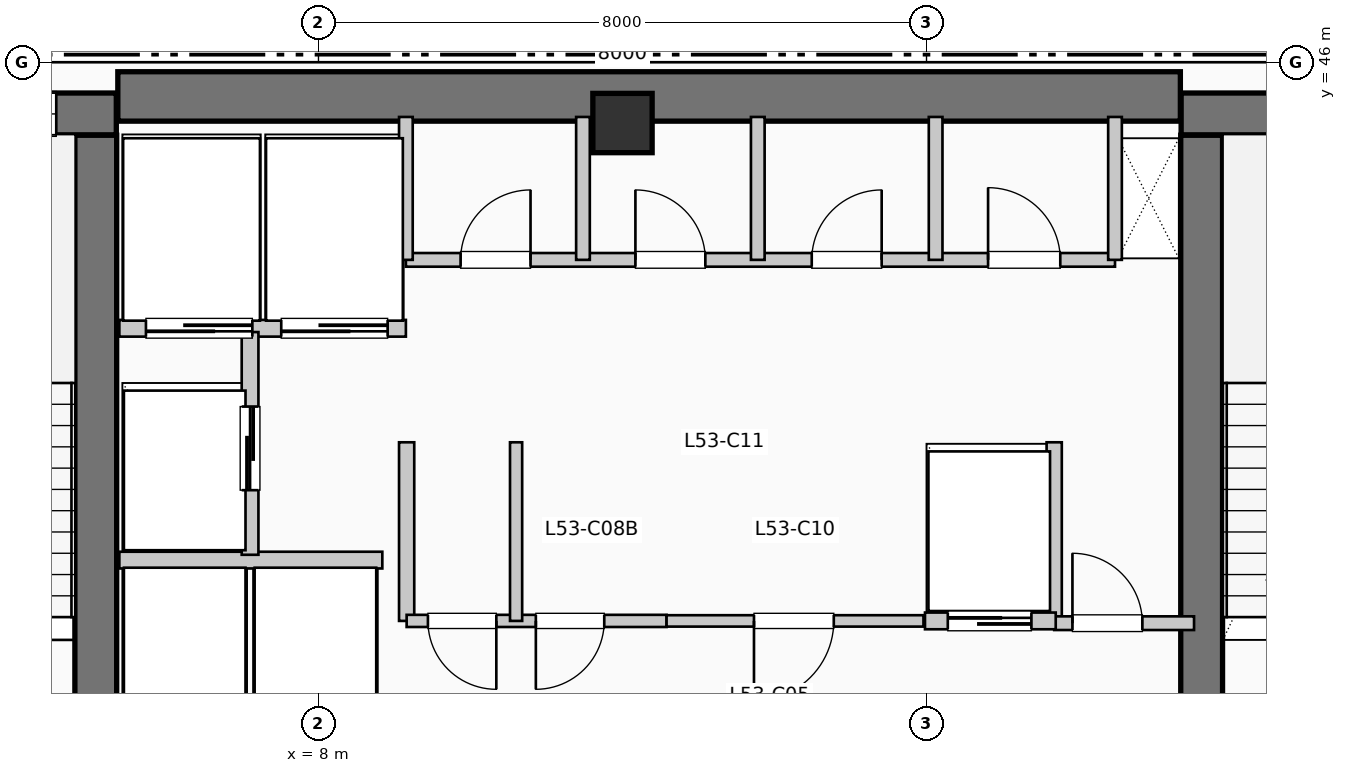
"""IFC4 building model, lengths in metres.
Left out: names, types, materials, properties, quantities, classifications, styles, units other than length and angle.
Written with IfcOpenShell. Run it as: python <this file> out.ifc"""

import sys

from ifc_helpers import new_model, si_unit, direction, frame, frame_2d, origin, origin_2d, place, context, subcontext, project, spatial, rectangle, extrude, element, fill, save


model = new_model("IFC4")
c1 = context("Model", 3, precision=1e-05, world=origin(), true_north=direction((0.0, 1.0)))
c2 = subcontext(c1, "Body", "Model", "MODEL_VIEW")
j1 = project(units=[si_unit("LENGTHUNIT", "METRE"), si_unit("PLANEANGLEUNIT", "RADIAN")], contexts=[c1])
p1 = place(None, origin())
s1 = spatial("IfcSite", under=j1, at=p1, CompositionType="ELEMENT")
p2 = place(p1, origin())
s2 = spatial("IfcBuilding", under=s1, at=p2, CompositionType="ELEMENT")
p3 = place(p2, frame((0.0, 0.0, 219.78)))
s3 = spatial("IfcBuildingStorey", under=s2, at=p3, CompositionType="ELEMENT", Elevation=219.78)
p4 = place(p3, frame((5.36, 45.55, 0.0), z_axis=(0.0, 0.0, 1.0), x_axis=(1.0, 0.0, 0.0)))
e1 = element("IfcWall", 1, at=p4, inside=s3, PredefinedType="SHEAR", context=c2, shape_type="SweptSolid", body=[
    extrude(rectangle(XDim=13.98, YDim=0.65, at=frame_2d((6.99, 0.0))), origin(), (0.0, 0.0, 1.0), 3.96),
])
p5 = place(p3, frame((5.07, 37.15, 0.0), z_axis=(0.0, 0.0, 1.0), x_axis=(0.0, 1.0, 0.0)))
e2 = element("IfcWall", 2, at=p5, inside=s3, PredefinedType="SHEAR", context=c2, shape_type="SweptSolid", body=[
    extrude(rectangle(XDim=7.89, YDim=0.55, at=frame_2d((3.945, 0.0))), origin(), (0.0, 0.0, 1.0), 3.96),
])
p6 = place(p3, frame((1.1, 45.32, 0.0), z_axis=(0.0, 0.0, 1.0), x_axis=(1.0, 0.0, 0.0)))
e3 = element("IfcWall", 3, at=p6, inside=s3, PredefinedType="SHEAR", context=c2, shape_type="SweptSolid", body=[
    extrude(rectangle(XDim=4.24, YDim=0.55, at=frame_2d((2.12, 0.0))), origin(), (0.0, 0.0, 1.0), 3.96),
])
p7 = place(p6, frame((2.05, 0.0, 1.05)))
e4 = element("IfcOpeningElement", 4, at=p7, cuts=e3, PredefinedType="OPENING", context=c2, shape_type="SweptSolid", body=[
    extrude(rectangle(XDim=1.4, YDim=1.8, at=frame_2d((0.7, 0.9))), frame((0.0, 0.285, 0.0), z_axis=(0.0, -1.0, 0.0), x_axis=(1.0, 0.0, 0.0)), (0.0, 0.0, 1.0), 0.57),
])
p8 = place(p3, frame((19.62, 37.15, 0.0), z_axis=(0.0, 0.0, 1.0), x_axis=(0.0, 1.0, 0.0)))
e5 = element("IfcWall", 5, at=p8, inside=s3, PredefinedType="SHEAR", context=c2, shape_type="SweptSolid", body=[
    extrude(rectangle(XDim=7.89, YDim=0.55, at=frame_2d((3.945, 0.0))), origin(), (0.0, 0.0, 1.0), 3.96),
])
p9 = place(p3, frame((19.35, 45.32, 0.0), z_axis=(0.0, 0.0, 1.0), x_axis=(1.0, 0.0, 0.0)))
e6 = element("IfcWall", 6, at=p9, inside=s3, PredefinedType="SHEAR", context=c2, shape_type="SweptSolid", body=[
    extrude(rectangle(XDim=3.69, YDim=0.55, at=frame_2d((1.845, 0.0))), origin(), (0.0, 0.0, 1.0), 3.96),
])
p10 = place(p9, frame((1.15, 0.0, 1.05)))
e7 = element("IfcOpeningElement", 7, at=p10, cuts=e6, PredefinedType="OPENING", context=c2, shape_type="SweptSolid", body=[
    extrude(rectangle(XDim=1.4, YDim=1.8, at=frame_2d((0.7, 0.9))), frame((0.0, 0.285, 0.0), z_axis=(0.0, -1.0, 0.0), x_axis=(1.0, 0.0, 0.0)), (0.0, 0.0, 1.0), 0.57),
])
p11 = place(p3, frame((12.0, 45.2, 0.0), z_axis=(0.0, 0.0, 1.0), x_axis=(1.0, 0.0, 0.0)))
e8 = element("IfcColumn", 8, at=p11, inside=s3, PredefinedType="COLUMN", context=c2, shape_type="SweptSolid", body=[
    extrude(rectangle(XDim=0.78, YDim=0.78, at=origin_2d()), origin(), (0.0, 0.0, 1.0), 3.96),
])
p12 = place(p3, frame((5.38, 39.45, 0.0), z_axis=(0.0, 0.0, 1.0), x_axis=(1.0, 0.0, 0.0)))
e9 = element("IfcWall", 9, at=p12, inside=s3, PredefinedType="PARTITIONING", context=c2, shape_type="SweptSolid", body=[
    extrude(rectangle(XDim=3.46, YDim=0.22, at=frame_2d((1.73, 0.0))), origin(), (0.0, 0.0, 1.0), 3.71),
])
p13 = place(p3, frame((5.38, 42.5, 0.0), z_axis=(0.0, 0.0, 1.0), x_axis=(1.0, 0.0, 0.0)))
e10 = element("IfcWall", 10, at=p13, inside=s3, PredefinedType="PARTITIONING", context=c2, shape_type="SweptSolid", body=[
    extrude(rectangle(XDim=3.77, YDim=0.22, at=frame_2d((1.885, 0.0))), origin(), (0.0, 0.0, 1.0), 3.71),
])
p14 = place(p13, frame((1.75, 0.0, 0.0), z_axis=(0.0, 0.0, 1.0), x_axis=(-1.0, 0.0, 0.0)))
e11 = element("IfcOpeningElement", 11, at=p14, cuts=e10, PredefinedType="OPENING", context=c2, shape_type="SweptSolid", body=[
    extrude(rectangle(XDim=1.4, YDim=2.2, at=frame_2d((0.7, 1.1))), frame((0.0, 0.12, 0.0), z_axis=(0.0, -1.0, 0.0), x_axis=(1.0, 0.0, 0.0)), (0.0, 0.0, 1.0), 0.24),
])
p15 = place(p13, frame((3.53, 0.0, 0.0), z_axis=(0.0, 0.0, 1.0), x_axis=(-1.0, 0.0, 0.0)))
e12 = element("IfcOpeningElement", 12, at=p15, cuts=e10, PredefinedType="OPENING", context=c2, shape_type="SweptSolid", body=[
    extrude(rectangle(XDim=1.4, YDim=2.2, at=frame_2d((0.7, 1.1))), frame((0.0, 0.12, 0.0), z_axis=(0.0, -1.0, 0.0), x_axis=(1.0, 0.0, 0.0)), (0.0, 0.0, 1.0), 0.24),
])
p16 = place(p3, frame((7.1, 39.52, 0.0), z_axis=(0.0, 0.0, 1.0), x_axis=(0.0, 1.0, 0.0)))
e13 = element("IfcWall", 13, at=p16, inside=s3, PredefinedType="PARTITIONING", context=c2, shape_type="SweptSolid", body=[
    extrude(rectangle(XDim=2.93, YDim=0.22, at=frame_2d((1.465, 0.0))), origin(), (0.0, 0.0, 1.0), 3.71),
])
p17 = place(p16, frame((0.85, 0.0, 0.0)))
e14 = element("IfcOpeningElement", 14, at=p17, cuts=e13, PredefinedType="OPENING", context=c2, shape_type="SweptSolid", body=[
    extrude(rectangle(XDim=1.1, YDim=2.2, at=frame_2d((0.55, 1.1))), frame((0.0, 0.12, 0.0), z_axis=(0.0, -1.0, 0.0), x_axis=(1.0, 0.0, 0.0)), (0.0, 0.0, 1.0), 0.24),
])
for number, where, z_axis, x_axis in (
    (15, (9.16, 38.65, 0.0), (0.0, 0.0, 1.0), (0.0, 1.0, 0.0)),
    (16, (17.68, 38.65, 0.0), (0.0, 0.0, 1.0), (0.0, 1.0, 0.0)),
):
    element("IfcWall", number, at=place(p3, frame(where, z_axis=z_axis, x_axis=x_axis)), inside=s3, PredefinedType="PARTITIONING", context=c2, shape_type="SweptSolid", body=[
        extrude(rectangle(XDim=2.35, YDim=0.2, at=frame_2d((1.175, 0.0))), origin(), (0.0, 0.0, 1.0), 3.71),
    ])
p18 = place(p3, frame((17.68, 38.62, 0.0), z_axis=(0.0, 0.0, 1.0), x_axis=(1.0, 0.0, 0.0)))
e17 = element("IfcWall", 17, at=p18, inside=s3, PredefinedType="PARTITIONING", context=c2, shape_type="SweptSolid", body=[
    extrude(rectangle(XDim=1.84, YDim=0.18, at=frame_2d((0.92, 0.0))), origin(), (0.0, 0.0, 1.0), 3.71),
])
p19 = place(p18, frame((0.24, 0.0, 0.0)))
e18 = element("IfcOpeningElement", 18, at=p19, cuts=e17, PredefinedType="OPENING", context=c2, shape_type="SweptSolid", body=[
    extrude(rectangle(XDim=0.92, YDim=2.1, at=frame_2d((0.46, 1.05))), frame((0.0, 0.1, 0.0), z_axis=(0.0, -1.0, 0.0), x_axis=(1.0, 0.0, 0.0)), (0.0, 0.0, 1.0), 0.2),
])
p20 = place(p3, frame((9.16, 38.65, 0.0), z_axis=(0.0, 0.0, 1.0), x_axis=(1.0, 0.0, 0.0)))
e19 = element("IfcWall", 19, at=p20, inside=s3, PredefinedType="PARTITIONING", context=c2, shape_type="SweptSolid", body=[
    extrude(rectangle(XDim=3.42, YDim=0.16, at=frame_2d((1.71, 0.0))), origin(), (0.0, 0.0, 1.0), 3.71),
])
p21 = place(p20, frame((1.18, 0.0, 0.0), z_axis=(0.0, 0.0, 1.0), x_axis=(-1.0, 0.0, 0.0)))
e20 = element("IfcOpeningElement", 20, at=p21, cuts=e19, PredefinedType="OPENING", context=c2, shape_type="SweptSolid", body=[
    extrude(rectangle(XDim=0.9, YDim=2.15, at=frame_2d((0.45, 1.075))), frame((0.0, 0.09, 0.0), z_axis=(0.0, -1.0, 0.0), x_axis=(1.0, 0.0, 0.0)), (0.0, 0.0, 1.0), 0.18),
])
p22 = place(p20, frame((2.6, 0.0, 0.0), z_axis=(0.0, 0.0, 1.0), x_axis=(-1.0, 0.0, 0.0)))
e21 = element("IfcOpeningElement", 21, at=p22, cuts=e19, PredefinedType="OPENING", context=c2, shape_type="SweptSolid", body=[
    extrude(rectangle(XDim=0.9, YDim=2.15, at=frame_2d((0.45, 1.075))), frame((0.0, 0.09, 0.0), z_axis=(0.0, -1.0, 0.0), x_axis=(1.0, 0.0, 0.0)), (0.0, 0.0, 1.0), 0.18),
])
p23 = place(p3, frame((10.6, 38.65, 0.0), z_axis=(0.0, 0.0, 1.0), x_axis=(0.0, 1.0, 0.0)))
e22 = element("IfcWall", 22, at=p23, inside=s3, PredefinedType="PARTITIONING", context=c2, shape_type="SweptSolid", body=[
    extrude(rectangle(XDim=2.35, YDim=0.16, at=frame_2d((1.175, 0.0))), origin(), (0.0, 0.0, 1.0), 3.71),
])
p24 = place(p3, frame((12.58, 38.65, 0.0), z_axis=(0.0, 0.0, 1.0), x_axis=(1.0, 0.0, 0.0)))
e23 = element("IfcWall", 23, at=p24, inside=s3, PredefinedType="PARTITIONING", context=c2, shape_type="SweptSolid", body=[
    extrude(rectangle(XDim=3.38, YDim=0.15, at=frame_2d((1.69, 0.0))), origin(), (0.0, 0.0, 1.0), 3.71),
])
p25 = place(p24, frame((2.2, 0.0, 0.0), z_axis=(0.0, 0.0, 1.0), x_axis=(-1.0, 0.0, 0.0)))
e24 = element("IfcOpeningElement", 24, at=p25, cuts=e23, PredefinedType="OPENING", context=c2, shape_type="SweptSolid", body=[
    extrude(rectangle(XDim=1.05, YDim=2.15, at=frame_2d((0.525, 1.075))), frame((0.0, 0.085, 0.0), z_axis=(0.0, -1.0, 0.0), x_axis=(1.0, 0.0, 0.0)), (0.0, 0.0, 1.0), 0.17),
])
p26 = place(p3, frame((15.98, 38.65, 0.0), z_axis=(0.0, 0.0, 1.0), x_axis=(1.0, 0.0, 0.0)))
e25 = element("IfcWall", 25, at=p26, inside=s3, PredefinedType="PARTITIONING", context=c2, shape_type="SweptSolid", body=[
    extrude(rectangle(XDim=1.72, YDim=0.22, at=frame_2d((0.86, 0.0))), origin(), (0.0, 0.0, 1.0), 3.71),
])
p27 = place(p26, frame((0.3, 0.0, 0.0)))
e26 = element("IfcOpeningElement", 26, at=p27, cuts=e25, PredefinedType="OPENING", context=c2, shape_type="SweptSolid", body=[
    extrude(rectangle(XDim=1.1, YDim=2.2, at=frame_2d((0.55, 1.1))), frame((0.0, 0.12, 0.0), z_axis=(0.0, -1.0, 0.0), x_axis=(1.0, 0.0, 0.0)), (0.0, 0.0, 1.0), 0.24),
])
p28 = place(p3, frame((9.15, 43.4, 0.0), z_axis=(0.0, 0.0, 1.0), x_axis=(1.0, 0.0, 0.0)))
e27 = element("IfcWall", 27, at=p28, inside=s3, PredefinedType="PLUMBINGWALL", context=c2, shape_type="SweptSolid", body=[
    extrude(rectangle(XDim=9.33, YDim=0.18, at=frame_2d((4.665, 0.0))), origin(), (0.0, 0.0, 1.0), 3.71),
])
p29 = place(p28, frame((0.72, 0.0, 0.0)))
e28 = element("IfcOpeningElement", 28, at=p29, cuts=e27, PredefinedType="OPENING", context=c2, shape_type="SweptSolid", body=[
    extrude(rectangle(XDim=0.92, YDim=2.1, at=frame_2d((0.46, 1.05))), frame((0.0, 0.1, 0.0), z_axis=(0.0, -1.0, 0.0), x_axis=(1.0, 0.0, 0.0)), (0.0, 0.0, 1.0), 0.2),
])
p30 = place(p28, frame((3.02, 0.0, 0.0)))
e29 = element("IfcOpeningElement", 29, at=p30, cuts=e27, PredefinedType="OPENING", context=c2, shape_type="SweptSolid", body=[
    extrude(rectangle(XDim=0.92, YDim=2.1, at=frame_2d((0.46, 1.05))), frame((0.0, 0.1, 0.0), z_axis=(0.0, -1.0, 0.0), x_axis=(1.0, 0.0, 0.0)), (0.0, 0.0, 1.0), 0.2),
])
p31 = place(p28, frame((5.34, 0.0, 0.0)))
e30 = element("IfcOpeningElement", 30, at=p31, cuts=e27, PredefinedType="OPENING", context=c2, shape_type="SweptSolid", body=[
    extrude(rectangle(XDim=0.92, YDim=2.1, at=frame_2d((0.46, 1.05))), frame((0.0, 0.1, 0.0), z_axis=(0.0, -1.0, 0.0), x_axis=(1.0, 0.0, 0.0)), (0.0, 0.0, 1.0), 0.2),
])
p32 = place(p28, frame((7.66, 0.0, 0.0)))
e31 = element("IfcOpeningElement", 31, at=p32, cuts=e27, PredefinedType="OPENING", context=c2, shape_type="SweptSolid", body=[
    extrude(rectangle(XDim=0.95, YDim=2.1, at=frame_2d((0.475, 1.05))), frame((0.0, 0.1, 0.0), z_axis=(0.0, -1.0, 0.0), x_axis=(1.0, 0.0, 0.0)), (0.0, 0.0, 1.0), 0.2),
])
for number, where, z_axis, x_axis in (
    (32, (9.15, 43.4, 0.0), (0.0, 0.0, 1.0), (0.0, 1.0, 0.0)),
    (33, (18.48, 43.4, 0.0), (0.0, 0.0, 1.0), (0.0, 1.0, 0.0)),
    (34, (11.48, 43.4, 0.0), (0.0, 0.0, 1.0), (0.0, 1.0, 0.0)),
    (35, (13.78, 43.4, 0.0), (0.0, 0.0, 1.0), (0.0, 1.0, 0.0)),
    (36, (16.12, 43.4, 0.0), (0.0, 0.0, 1.0), (0.0, 1.0, 0.0)),
):
    element("IfcWall", number, at=place(p3, frame(where, z_axis=z_axis, x_axis=x_axis)), inside=s3, PredefinedType="PLUMBINGWALL", context=c2, shape_type="SweptSolid", body=[
        extrude(rectangle(XDim=1.88, YDim=0.18, at=frame_2d((0.94, 0.0))), origin(), (0.0, 0.0, 1.0), 3.71),
    ])
p33 = place(p7, origin())
e37 = element("IfcWindow", 37, at=p33, inside=s3, PartitioningType="SINGLE_PANEL", PredefinedType="WINDOW", context=c2, shape_type="SweptSolid", body=[
    extrude(rectangle(XDim=1.4, YDim=1.8, at=frame_2d((0.7, 0.9))), frame((0.0, 0.03, 0.0), z_axis=(0.0, -1.0, 0.0), x_axis=(1.0, 0.0, 0.0)), (0.0, 0.0, 1.0), 0.06),
])
fill(e4, e37)
p34 = place(p14, origin())
e38 = element("IfcDoor", 38, at=p34, inside=s3, OperationType="SLIDING_TO_LEFT", PredefinedType="DOOR", context=c2, shape_type="SweptSolid", body=[
    extrude(rectangle(XDim=1.4, YDim=2.2, at=frame_2d((0.7, 1.1))), frame((0.0, 0.025, 0.0), z_axis=(0.0, -1.0, 0.0), x_axis=(1.0, 0.0, 0.0)), (0.0, 0.0, 1.0), 0.05),
])
fill(e11, e38)
p35 = place(p15, origin())
e39 = element("IfcDoor", 39, at=p35, inside=s3, OperationType="SLIDING_TO_LEFT", PredefinedType="DOOR", context=c2, shape_type="SweptSolid", body=[
    extrude(rectangle(XDim=1.4, YDim=2.2, at=frame_2d((0.7, 1.1))), frame((0.0, 0.025, 0.0), z_axis=(0.0, -1.0, 0.0), x_axis=(1.0, 0.0, 0.0)), (0.0, 0.0, 1.0), 0.05),
])
fill(e12, e39)
p36 = place(p17, origin())
e40 = element("IfcDoor", 40, at=p36, inside=s3, OperationType="SLIDING_TO_LEFT", PredefinedType="DOOR", context=c2, shape_type="SweptSolid", body=[
    extrude(rectangle(XDim=1.1, YDim=2.2, at=frame_2d((0.55, 1.1))), frame((0.0, 0.025, 0.0), z_axis=(0.0, -1.0, 0.0), x_axis=(1.0, 0.0, 0.0)), (0.0, 0.0, 1.0), 0.05),
])
fill(e14, e40)
p37 = place(p19, origin())
e41 = element("IfcDoor", 41, at=p37, inside=s3, OperationType="SINGLE_SWING_LEFT", PredefinedType="DOOR", context=c2, shape_type="SweptSolid", body=[
    extrude(rectangle(XDim=0.92, YDim=2.1, at=frame_2d((0.46, 1.05))), frame((0.0, 0.025, 0.0), z_axis=(0.0, -1.0, 0.0), x_axis=(1.0, 0.0, 0.0)), (0.0, 0.0, 1.0), 0.05),
])
fill(e18, e41)
p38 = place(p21, origin())
e42 = element("IfcDoor", 42, at=p38, inside=s3, OperationType="SINGLE_SWING_RIGHT", PredefinedType="DOOR", context=c2, shape_type="SweptSolid", body=[
    extrude(rectangle(XDim=0.9, YDim=2.15, at=frame_2d((0.45, 1.075))), frame((0.0, 0.025, 0.0), z_axis=(0.0, -1.0, 0.0), x_axis=(1.0, 0.0, 0.0)), (0.0, 0.0, 1.0), 0.05),
])
fill(e20, e42)
p39 = place(p22, origin())
e43 = element("IfcDoor", 43, at=p39, inside=s3, OperationType="SINGLE_SWING_LEFT", PredefinedType="DOOR", context=c2, shape_type="SweptSolid", body=[
    extrude(rectangle(XDim=0.9, YDim=2.15, at=frame_2d((0.45, 1.075))), frame((0.0, 0.025, 0.0), z_axis=(0.0, -1.0, 0.0), x_axis=(1.0, 0.0, 0.0)), (0.0, 0.0, 1.0), 0.05),
])
fill(e21, e43)
p40 = place(p25, origin())
e44 = element("IfcDoor", 44, at=p40, inside=s3, OperationType="SINGLE_SWING_LEFT", PredefinedType="DOOR", context=c2, shape_type="SweptSolid", body=[
    extrude(rectangle(XDim=1.05, YDim=2.15, at=frame_2d((0.525, 1.075))), frame((0.0, 0.025, 0.0), z_axis=(0.0, -1.0, 0.0), x_axis=(1.0, 0.0, 0.0)), (0.0, 0.0, 1.0), 0.05),
])
fill(e24, e44)
p41 = place(p27, origin())
e45 = element("IfcDoor", 45, at=p41, inside=s3, OperationType="SLIDING_TO_LEFT", PredefinedType="DOOR", context=c2, shape_type="SweptSolid", body=[
    extrude(rectangle(XDim=1.1, YDim=2.2, at=frame_2d((0.55, 1.1))), frame((0.0, 0.025, 0.0), z_axis=(0.0, -1.0, 0.0), x_axis=(1.0, 0.0, 0.0)), (0.0, 0.0, 1.0), 0.05),
])
fill(e26, e45)
p42 = place(p29, origin())
e46 = element("IfcDoor", 46, at=p42, inside=s3, OperationType="SINGLE_SWING_RIGHT", PredefinedType="DOOR", context=c2, shape_type="SweptSolid", body=[
    extrude(rectangle(XDim=0.92, YDim=2.1, at=frame_2d((0.46, 1.05))), frame((0.0, 0.025, 0.0), z_axis=(0.0, -1.0, 0.0), x_axis=(1.0, 0.0, 0.0)), (0.0, 0.0, 1.0), 0.05),
])
fill(e28, e46)
p43 = place(p30, origin())
e47 = element("IfcDoor", 47, at=p43, inside=s3, OperationType="SINGLE_SWING_LEFT", PredefinedType="DOOR", context=c2, shape_type="SweptSolid", body=[
    extrude(rectangle(XDim=0.92, YDim=2.1, at=frame_2d((0.46, 1.05))), frame((0.0, 0.025, 0.0), z_axis=(0.0, -1.0, 0.0), x_axis=(1.0, 0.0, 0.0)), (0.0, 0.0, 1.0), 0.05),
])
fill(e29, e47)
p44 = place(p31, origin())
e48 = element("IfcDoor", 48, at=p44, inside=s3, OperationType="SINGLE_SWING_RIGHT", PredefinedType="DOOR", context=c2, shape_type="SweptSolid", body=[
    extrude(rectangle(XDim=0.92, YDim=2.1, at=frame_2d((0.46, 1.05))), frame((0.0, 0.025, 0.0), z_axis=(0.0, -1.0, 0.0), x_axis=(1.0, 0.0, 0.0)), (0.0, 0.0, 1.0), 0.05),
])
fill(e30, e48)
p45 = place(p32, origin())
e49 = element("IfcDoor", 49, at=p45, inside=s3, OperationType="SINGLE_SWING_LEFT", PredefinedType="DOOR", context=c2, shape_type="SweptSolid", body=[
    extrude(rectangle(XDim=0.95, YDim=2.1, at=frame_2d((0.475, 1.05))), frame((0.0, 0.025, 0.0), z_axis=(0.0, -1.0, 0.0), x_axis=(1.0, 0.0, 0.0)), (0.0, 0.0, 1.0), 0.05),
])
fill(e31, e49)
save(model, sys.argv[1])
